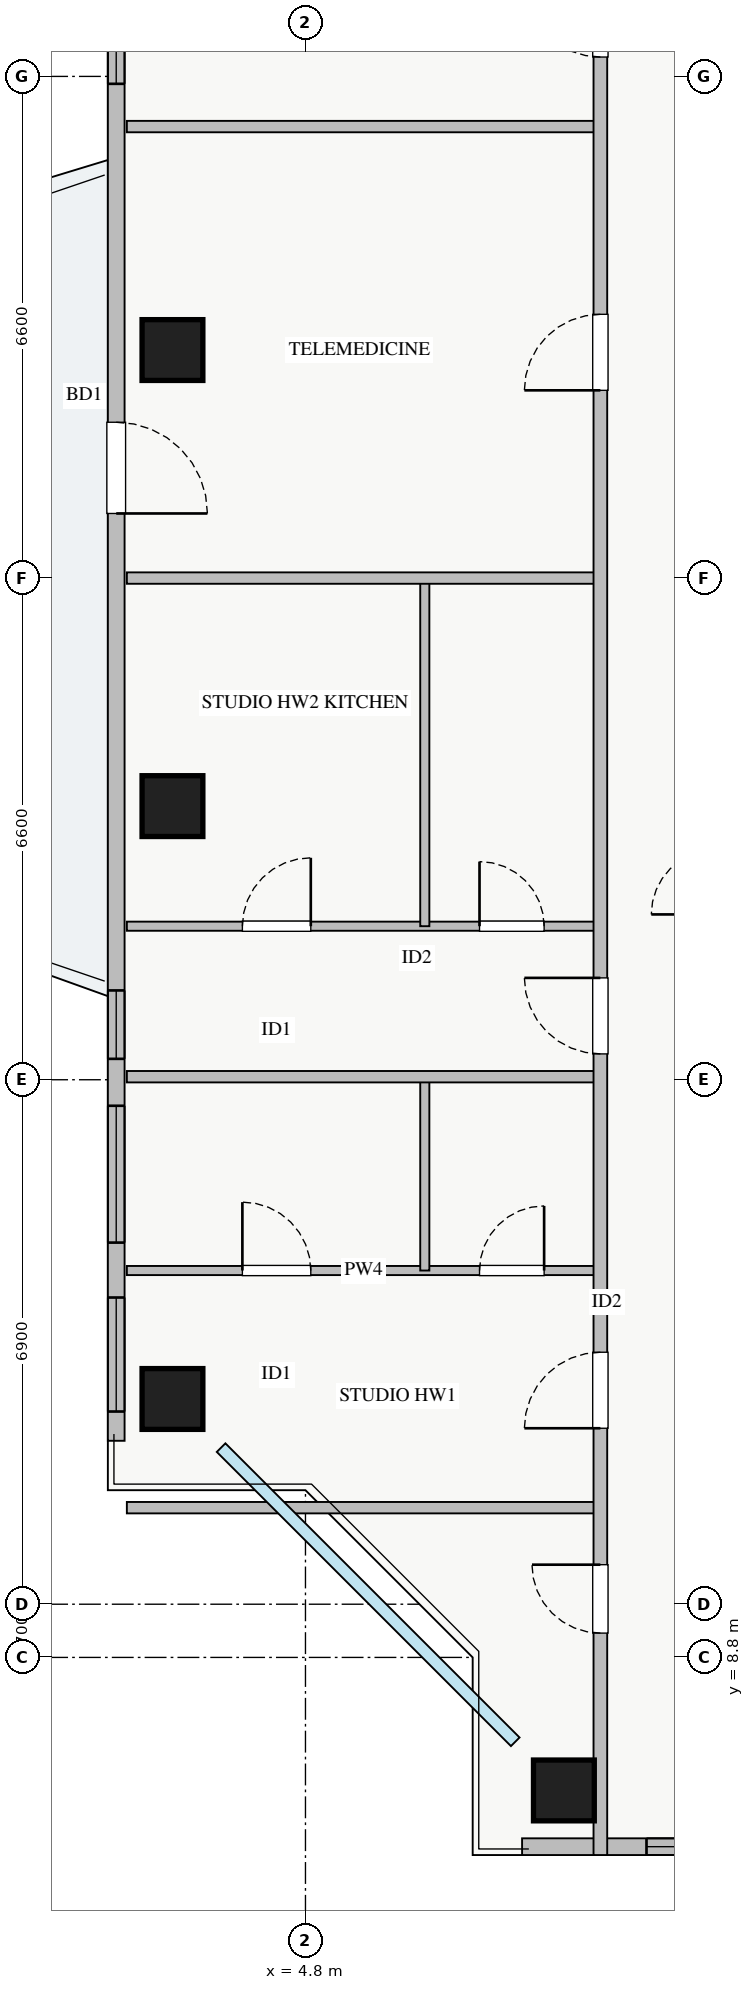
"""IFC4 building model, lengths in metres.
Left out: names, types, materials, properties, quantities, classifications, styles, units other than length and angle.
Written with IfcOpenShell. Run it as: python <this file> out.ifc"""

import sys

from ifc_helpers import new_model, si_unit, direction, frame, frame_2d, origin, origin_2d, place, context, subcontext, project, spatial, rectangle, extrude, source, transform, mapped, element, fill, save


model = new_model("IFC4")
c1 = context("Model", 3, precision=1e-05, world=origin(), true_north=direction((0.0, 1.0)))
c2 = subcontext(c1, "Body", "Model", "MODEL_VIEW")
j1 = project(units=[si_unit("LENGTHUNIT", "METRE"), si_unit("PLANEANGLEUNIT", "RADIAN")], contexts=[c1])
p1 = place(None, origin())
s1 = spatial("IfcSite", under=j1, at=p1, CompositionType="ELEMENT")
p2 = place(p1, origin())
s2 = spatial("IfcBuilding", under=s1, at=p2, CompositionType="ELEMENT")
p3 = place(p2, frame((0.0, 0.0, 213.25)))
s3 = spatial("IfcBuildingStorey", under=s2, at=p3, CompositionType="ELEMENT", Elevation=213.25)
m1 = source(origin(), c2, "Body", "SweptSolid", [
    extrude(rectangle(XDim=0.8, YDim=0.8, at=origin_2d()), origin(), (0.0, 0.0, 1.0), 3.25),
])
for number, where, z_axis, x_axis in (
    (1, (8.2, 7.05, 0.0), (0.0, 0.0, 1.0), (1.0, 0.0, 0.0)),
    (2, (3.05, 26.0, 0.0), (0.0, 0.0, 1.0), (1.0, 0.0, 0.0)),
    (3, (3.05, 20.0, 0.0), (0.0, 0.0, 1.0), (1.0, 0.0, 0.0)),
    (4, (3.05, 12.2, 0.0), (0.0, 0.0, 1.0), (1.0, 0.0, 0.0)),
):
    element("IfcColumn", number, at=place(p3, frame(where, z_axis=z_axis, x_axis=x_axis)), inside=s3, PredefinedType="COLUMN", context=c2, shape_type="MappedRepresentation", body=[
        mapped(m1, transform((0.0, 0.0, 0.0), x_axis=(1.0, 0.0, 0.0), y_axis=(0.0, 1.0, 0.0), z_axis=(0.0, 0.0, 1.0), scale=1.0)),
    ])
p4 = place(p3, frame((7.65, 6.31, 0.0), z_axis=(0.0, 0.0, 1.0), x_axis=(1.0, 0.0, 0.0)))
e5 = element("IfcWall", 5, at=p4, inside=s3, PredefinedType="STANDARD", context=c2, shape_type="SweptSolid", body=[
    extrude(rectangle(XDim=22.7, YDim=0.22, at=frame_2d((11.35, 0.0))), origin(), (0.0, 0.0, 1.0), 2.61),
])
p5 = place(p4, frame((12.2, 0.0, 0.0)))
e6 = element("IfcOpeningElement", 6, at=p5, cuts=e5, PredefinedType="OPENING", context=c2, shape_type="SweptSolid", body=[
    extrude(rectangle(XDim=1.2, YDim=2.1, at=frame_2d((0.6, 1.05))), frame((0.0, 0.12, 0.0), z_axis=(0.0, -1.0, 0.0), x_axis=(1.0, 0.0, 0.0)), (0.0, 0.0, 1.0), 0.24),
])
p6 = place(p4, frame((1.637, 0.0, 0.9)))
e7 = element("IfcOpeningElement", 7, at=p6, cuts=e5, PredefinedType="OPENING", context=c2, shape_type="SweptSolid", body=[
    extrude(rectangle(XDim=2.4, YDim=1.48, at=frame_2d((1.2, 0.74))), frame((0.0, 0.12, 0.0), z_axis=(0.0, -1.0, 0.0), x_axis=(1.0, 0.0, 0.0)), (0.0, 0.0, 1.0), 0.24),
])
p7 = place(p4, frame((7.612, 0.0, 0.9)))
e8 = element("IfcOpeningElement", 8, at=p7, cuts=e5, PredefinedType="OPENING", context=c2, shape_type="SweptSolid", body=[
    extrude(rectangle(XDim=1.8, YDim=1.45, at=frame_2d((0.9, 0.725))), frame((0.0, 0.12, 0.0), z_axis=(0.0, -1.0, 0.0), x_axis=(1.0, 0.0, 0.0)), (0.0, 0.0, 1.0), 0.24),
])
p8 = place(p4, frame((20.238, 0.0, 0.9)))
e9 = element("IfcOpeningElement", 9, at=p8, cuts=e5, PredefinedType="OPENING", context=c2, shape_type="SweptSolid", body=[
    extrude(rectangle(XDim=2.1, YDim=1.5, at=frame_2d((1.05, 0.75))), frame((0.0, 0.12, 0.0), z_axis=(0.0, -1.0, 0.0), x_axis=(1.0, 0.0, 0.0)), (0.0, 0.0, 1.0), 0.24),
])
p9 = place(p4, frame((17.02, 0.0, 0.9)))
e10 = element("IfcOpeningElement", 10, at=p9, cuts=e5, PredefinedType="OPENING", context=c2, shape_type="SweptSolid", body=[
    extrude(rectangle(XDim=2.4, YDim=1.5, at=frame_2d((1.2, 0.75))), frame((0.0, 0.12, 0.0), z_axis=(0.0, -1.0, 0.0), x_axis=(1.0, 0.0, 0.0)), (0.0, 0.0, 1.0), 0.24),
])
p10 = place(p3, frame((2.31, 11.65, 0.0), z_axis=(0.0, 0.0, 1.0), x_axis=(0.0, 1.0, 0.0)))
e11 = element("IfcWall", 11, at=p10, inside=s3, PredefinedType="STANDARD", context=c2, shape_type="SweptSolid", body=[
    extrude(rectangle(XDim=22.7, YDim=0.22, at=frame_2d((11.35, 0.0))), origin(), (0.0, 0.0, 1.0), 2.61),
])
p11 = place(p10, frame((12.2, 0.0, 0.0)))
e12 = element("IfcOpeningElement", 12, at=p11, cuts=e11, PredefinedType="OPENING", context=c2, shape_type="SweptSolid", body=[
    extrude(rectangle(XDim=1.2, YDim=2.1, at=frame_2d((0.6, 1.05))), frame((0.0, 0.12, 0.0), z_axis=(0.0, -1.0, 0.0), x_axis=(1.0, 0.0, 0.0)), (0.0, 0.0, 1.0), 0.24),
])
p12 = place(p10, frame((2.607, 0.0, 0.9)))
e13 = element("IfcOpeningElement", 13, at=p12, cuts=e11, PredefinedType="OPENING", context=c2, shape_type="SweptSolid", body=[
    extrude(rectangle(XDim=1.8, YDim=1.5, at=frame_2d((0.9, 0.75))), frame((0.0, 0.12, 0.0), z_axis=(0.0, -1.0, 0.0), x_axis=(1.0, 0.0, 0.0)), (0.0, 0.0, 1.0), 0.24),
])
p13 = place(p10, frame((17.853, 0.0, 0.9)))
e14 = element("IfcOpeningElement", 14, at=p13, cuts=e11, PredefinedType="OPENING", context=c2, shape_type="SweptSolid", body=[
    extrude(rectangle(XDim=2.1, YDim=1.5, at=frame_2d((1.05, 0.75))), frame((0.0, 0.12, 0.0), z_axis=(0.0, -1.0, 0.0), x_axis=(1.0, 0.0, 0.0)), (0.0, 0.0, 1.0), 0.24),
])
p14 = place(p10, frame((0.385, 0.0, 0.9)))
e15 = element("IfcOpeningElement", 15, at=p14, cuts=e11, PredefinedType="OPENING", context=c2, shape_type="SweptSolid", body=[
    extrude(rectangle(XDim=1.5, YDim=1.5, at=frame_2d((0.75, 0.75))), frame((0.0, 0.12, 0.0), z_axis=(0.0, -1.0, 0.0), x_axis=(1.0, 0.0, 0.0)), (0.0, 0.0, 1.0), 0.24),
])
p15 = place(p10, frame((20.835, 0.0, 0.9)))
e16 = element("IfcOpeningElement", 16, at=p15, cuts=e11, PredefinedType="OPENING", context=c2, shape_type="SweptSolid", body=[
    extrude(rectangle(XDim=1.5, YDim=1.5, at=frame_2d((0.75, 0.75))), frame((0.0, 0.12, 0.0), z_axis=(0.0, -1.0, 0.0), x_axis=(1.0, 0.0, 0.0)), (0.0, 0.0, 1.0), 0.24),
])
p16 = place(p10, frame((5.025, 0.0, 0.9)))
e17 = element("IfcOpeningElement", 17, at=p16, cuts=e11, PredefinedType="OPENING", context=c2, shape_type="SweptSolid", body=[
    extrude(rectangle(XDim=0.9, YDim=1.2, at=frame_2d((0.45, 0.6))), frame((0.0, 0.12, 0.0), z_axis=(0.0, -1.0, 0.0), x_axis=(1.0, 0.0, 0.0)), (0.0, 0.0, 1.0), 0.24),
])
p17 = place(p3, frame((2.45, 10.77, 0.0), z_axis=(0.0, 0.0, 1.0), x_axis=(1.0, 0.0, 0.0)))
e18 = element("IfcWall", 18, at=p17, inside=s3, PredefinedType="PARTITIONING", context=c2, shape_type="SweptSolid", body=[
    extrude(rectangle(XDim=6.23, YDim=0.15, at=frame_2d((3.115, 0.0))), origin(), (0.0, 0.0, 1.0), 3.07),
])
p18 = place(p3, frame((2.45, 13.89, 0.0), z_axis=(0.0, 0.0, 1.0), x_axis=(1.0, 0.0, 0.0)))
e19 = element("IfcWall", 19, at=p18, inside=s3, PredefinedType="PLUMBINGWALL", context=c2, shape_type="SweptSolid", body=[
    extrude(rectangle(XDim=6.23, YDim=0.12, at=frame_2d((3.115, 0.0))), origin(), (0.0, 0.0, 1.0), 3.07),
])
p19 = place(p18, frame((1.52, 0.0, 0.0)))
e20 = element("IfcOpeningElement", 20, at=p19, cuts=e19, PredefinedType="OPENING", context=c2, shape_type="SweptSolid", body=[
    extrude(rectangle(XDim=0.9, YDim=2.05, at=frame_2d((0.45, 1.025))), frame((0.0, 0.07, 0.0), z_axis=(0.0, -1.0, 0.0), x_axis=(1.0, 0.0, 0.0)), (0.0, 0.0, 1.0), 0.14),
])
p20 = place(p18, frame((4.64, 0.0, 0.0)))
e21 = element("IfcOpeningElement", 21, at=p20, cuts=e19, PredefinedType="OPENING", context=c2, shape_type="SweptSolid", body=[
    extrude(rectangle(XDim=0.85, YDim=2.05, at=frame_2d((0.425, 1.025))), frame((0.0, 0.07, 0.0), z_axis=(0.0, -1.0, 0.0), x_axis=(1.0, 0.0, 0.0)), (0.0, 0.0, 1.0), 0.14),
])
p21 = place(p3, frame((6.37, 13.89, 0.0), z_axis=(0.0, 0.0, 1.0), x_axis=(0.0, 1.0, 0.0)))
e22 = element("IfcWall", 22, at=p21, inside=s3, PredefinedType="PLUMBINGWALL", context=c2, shape_type="SweptSolid", body=[
    extrude(rectangle(XDim=2.55, YDim=0.12, at=frame_2d((1.275, 0.0))), origin(), (0.0, 0.0, 1.0), 3.07),
])
p22 = place(p3, frame((2.45, 18.42, 0.0), z_axis=(0.0, 0.0, 1.0), x_axis=(1.0, 0.0, 0.0)))
e23 = element("IfcWall", 23, at=p22, inside=s3, PredefinedType="PLUMBINGWALL", context=c2, shape_type="SweptSolid", body=[
    extrude(rectangle(XDim=6.23, YDim=0.12, at=frame_2d((3.115, 0.0))), origin(), (0.0, 0.0, 1.0), 3.07),
])
p23 = place(p22, frame((1.52, 0.0, 0.0)))
e24 = element("IfcOpeningElement", 24, at=p23, cuts=e23, PredefinedType="OPENING", context=c2, shape_type="SweptSolid", body=[
    extrude(rectangle(XDim=0.9, YDim=2.05, at=frame_2d((0.45, 1.025))), frame((0.0, 0.07, 0.0), z_axis=(0.0, -1.0, 0.0), x_axis=(1.0, 0.0, 0.0)), (0.0, 0.0, 1.0), 0.14),
])
p24 = place(p22, frame((4.64, 0.0, 0.0)))
e25 = element("IfcOpeningElement", 25, at=p24, cuts=e23, PredefinedType="OPENING", context=c2, shape_type="SweptSolid", body=[
    extrude(rectangle(XDim=0.85, YDim=2.05, at=frame_2d((0.425, 1.025))), frame((0.0, 0.07, 0.0), z_axis=(0.0, -1.0, 0.0), x_axis=(1.0, 0.0, 0.0)), (0.0, 0.0, 1.0), 0.14),
])
p25 = place(p3, frame((6.37, 18.42, 0.0), z_axis=(0.0, 0.0, 1.0), x_axis=(0.0, 1.0, 0.0)))
e26 = element("IfcWall", 26, at=p25, inside=s3, PredefinedType="PLUMBINGWALL", context=c2, shape_type="SweptSolid", body=[
    extrude(rectangle(XDim=4.58, YDim=0.12, at=frame_2d((2.29, 0.0))), origin(), (0.0, 0.0, 1.0), 3.07),
])
for number, where, z_axis, x_axis in (
    (27, (2.45, 16.44, 0.0), (0.0, 0.0, 1.0), (1.0, 0.0, 0.0)),
    (28, (2.45, 23.0, 0.0), (0.0, 0.0, 1.0), (1.0, 0.0, 0.0)),
    (29, (2.45, 28.94, 0.0), (0.0, 0.0, 1.0), (1.0, 0.0, 0.0)),
):
    element("IfcWall", number, at=place(p3, frame(where, z_axis=z_axis, x_axis=x_axis)), inside=s3, PredefinedType="PARTITIONING", context=c2, shape_type="SweptSolid", body=[
        extrude(rectangle(XDim=6.23, YDim=0.15, at=frame_2d((3.115, 0.0))), origin(), (0.0, 0.0, 1.0), 3.07),
    ])
p26 = place(p3, frame((8.68, 6.2, 0.0), z_axis=(0.0, 0.0, 1.0), x_axis=(0.0, 1.0, 0.0)))
e30 = element("IfcWall", 30, at=p26, inside=s3, PredefinedType="PARTITIONING", context=c2, shape_type="SweptSolid", body=[
    extrude(rectangle(XDim=33.6, YDim=0.18, at=frame_2d((16.8, 0.0))), origin(), (0.0, 0.0, 1.0), 3.07),
])
p27 = place(p26, frame((29.605, 0.0, 0.0)))
e31 = element("IfcOpeningElement", 31, at=p27, cuts=e30, PredefinedType="OPENING", context=c2, shape_type="SweptSolid", body=[
    extrude(rectangle(XDim=0.9, YDim=2.05, at=frame_2d((0.45, 1.025))), frame((0.0, 0.1, 0.0), z_axis=(0.0, -1.0, 0.0), x_axis=(1.0, 0.0, 0.0)), (0.0, 0.0, 1.0), 0.2),
])
p28 = place(p26, frame((2.92, 0.0, 0.0)))
e32 = element("IfcOpeningElement", 32, at=p28, cuts=e30, PredefinedType="OPENING", context=c2, shape_type="SweptSolid", body=[
    extrude(rectangle(XDim=0.9, YDim=2.05, at=frame_2d((0.45, 1.025))), frame((0.0, 0.1, 0.0), z_axis=(0.0, -1.0, 0.0), x_axis=(1.0, 0.0, 0.0)), (0.0, 0.0, 1.0), 0.2),
])
p29 = place(p26, frame((5.615, 0.0, 0.0)))
e33 = element("IfcOpeningElement", 33, at=p29, cuts=e30, PredefinedType="OPENING", context=c2, shape_type="SweptSolid", body=[
    extrude(rectangle(XDim=1.0, YDim=2.05, at=frame_2d((0.5, 1.025))), frame((0.0, 0.1, 0.0), z_axis=(0.0, -1.0, 0.0), x_axis=(1.0, 0.0, 0.0)), (0.0, 0.0, 1.0), 0.2),
])
p30 = place(p26, frame((10.54, 0.0, 0.0)))
e34 = element("IfcOpeningElement", 34, at=p30, cuts=e30, PredefinedType="OPENING", context=c2, shape_type="SweptSolid", body=[
    extrude(rectangle(XDim=1.0, YDim=2.05, at=frame_2d((0.5, 1.025))), frame((0.0, 0.1, 0.0), z_axis=(0.0, -1.0, 0.0), x_axis=(1.0, 0.0, 0.0)), (0.0, 0.0, 1.0), 0.2),
])
p31 = place(p26, frame((19.27, 0.0, 0.0)))
e35 = element("IfcOpeningElement", 35, at=p31, cuts=e30, PredefinedType="OPENING", context=c2, shape_type="SweptSolid", body=[
    extrude(rectangle(XDim=1.0, YDim=2.05, at=frame_2d((0.5, 1.025))), frame((0.0, 0.1, 0.0), z_axis=(0.0, -1.0, 0.0), x_axis=(1.0, 0.0, 0.0)), (0.0, 0.0, 1.0), 0.2),
])
p32 = place(p26, frame((23.655, 0.0, 0.0)))
e36 = element("IfcOpeningElement", 36, at=p32, cuts=e30, PredefinedType="OPENING", context=c2, shape_type="SweptSolid", body=[
    extrude(rectangle(XDim=1.0, YDim=2.05, at=frame_2d((0.5, 1.025))), frame((0.0, 0.1, 0.0), z_axis=(0.0, -1.0, 0.0), x_axis=(1.0, 0.0, 0.0)), (0.0, 0.0, 1.0), 0.2),
])
m2 = source(origin(), c2, "Body", "SweptSolid", [
    extrude(rectangle(XDim=2.4, YDim=1.48, at=frame_2d((1.2, 0.74))), frame((0.0, 0.03, 0.0), z_axis=(0.0, -1.0, 0.0), x_axis=(1.0, 0.0, 0.0)), (0.0, 0.0, 1.0), 0.06),
])
p33 = place(p6, origin())
e37 = element("IfcWindow", 37, at=p33, inside=s3, PartitioningType="TRIPLE_PANEL_VERTICAL", PredefinedType="WINDOW", context=c2, shape_type="MappedRepresentation", body=[
    mapped(m2, transform((0.0, 0.0, 0.0), x_axis=(1.0, 0.0, 0.0), y_axis=(0.0, 1.0, 0.0), z_axis=(0.0, 0.0, 1.0), scale=1.0)),
])
fill(e7, e37)
m3 = source(origin(), c2, "Body", "SweptSolid", [
    extrude(rectangle(XDim=1.2, YDim=2.1, at=frame_2d((0.6, 1.05))), frame((0.0, 0.025, 0.0), z_axis=(0.0, -1.0, 0.0), x_axis=(1.0, 0.0, 0.0)), (0.0, 0.0, 1.0), 0.05),
])
p34 = place(p11, frame((1.2, 0.0, 0.0), z_axis=(0.0, 0.0, 1.0), x_axis=(-1.0, 0.0, 0.0)))
e38 = element("IfcDoor", 38, at=p34, inside=s3, OperationType="SINGLE_SWING_LEFT", PredefinedType="DOOR", context=c2, shape_type="MappedRepresentation", body=[
    mapped(m3, transform((0.0, 0.0, 0.0), x_axis=(1.0, 0.0, 0.0), y_axis=(0.0, 1.0, 0.0), z_axis=(0.0, 0.0, 1.0), scale=1.0)),
])
fill(e12, e38)
m4 = source(origin(), c2, "Body", "SweptSolid", [
    extrude(rectangle(XDim=1.8, YDim=1.5, at=frame_2d((0.9, 0.75))), frame((0.0, 0.03, 0.0), z_axis=(0.0, -1.0, 0.0), x_axis=(1.0, 0.0, 0.0)), (0.0, 0.0, 1.0), 0.06),
])
p35 = place(p12, origin())
e39 = element("IfcWindow", 39, at=p35, inside=s3, PartitioningType="TRIPLE_PANEL_VERTICAL", PredefinedType="WINDOW", context=c2, shape_type="MappedRepresentation", body=[
    mapped(m4, transform((0.0, 0.0, 0.0), x_axis=(1.0, 0.0, 0.0), y_axis=(0.0, 1.0, 0.0), z_axis=(0.0, 0.0, 1.0), scale=1.0)),
])
fill(e13, e39)
m5 = source(origin(), c2, "Body", "SweptSolid", [
    extrude(rectangle(XDim=2.1, YDim=1.5, at=frame_2d((1.05, 0.75))), frame((0.0, 0.03, 0.0), z_axis=(0.0, -1.0, 0.0), x_axis=(1.0, 0.0, 0.0)), (0.0, 0.0, 1.0), 0.06),
])
p36 = place(p13, origin())
e40 = element("IfcWindow", 40, at=p36, inside=s3, PartitioningType="TRIPLE_PANEL_VERTICAL", PredefinedType="WINDOW", context=c2, shape_type="MappedRepresentation", body=[
    mapped(m5, transform((0.0, 0.0, 0.0), x_axis=(1.0, 0.0, 0.0), y_axis=(0.0, 1.0, 0.0), z_axis=(0.0, 0.0, 1.0), scale=1.0)),
])
fill(e14, e40)
m6 = source(origin(), c2, "Body", "SweptSolid", [
    extrude(rectangle(XDim=0.9, YDim=2.05, at=frame_2d((0.45, 1.025))), frame((0.0, 0.025, 0.0), z_axis=(0.0, -1.0, 0.0), x_axis=(1.0, 0.0, 0.0)), (0.0, 0.0, 1.0), 0.05),
])
p37 = place(p19, origin())
e41 = element("IfcDoor", 41, at=p37, inside=s3, OperationType="SINGLE_SWING_LEFT", PredefinedType="DOOR", context=c2, shape_type="MappedRepresentation", body=[
    mapped(m6, transform((0.0, 0.0, 0.0), x_axis=(1.0, 0.0, 0.0), y_axis=(0.0, 1.0, 0.0), z_axis=(0.0, 0.0, 1.0), scale=1.0)),
])
fill(e20, e41)
m7 = source(origin(), c2, "Body", "SweptSolid", [
    extrude(rectangle(XDim=0.85, YDim=2.05, at=frame_2d((0.425, 1.025))), frame((0.0, 0.025, 0.0), z_axis=(0.0, -1.0, 0.0), x_axis=(1.0, 0.0, 0.0)), (0.0, 0.0, 1.0), 0.05),
])
p38 = place(p20, origin())
e42 = element("IfcDoor", 42, at=p38, inside=s3, OperationType="SINGLE_SWING_RIGHT", PredefinedType="DOOR", context=c2, shape_type="MappedRepresentation", body=[
    mapped(m7, transform((0.0, 0.0, 0.0), x_axis=(1.0, 0.0, 0.0), y_axis=(0.0, 1.0, 0.0), z_axis=(0.0, 0.0, 1.0), scale=1.0)),
])
fill(e21, e42)
p39 = place(p23, origin())
e43 = element("IfcDoor", 43, at=p39, inside=s3, OperationType="SINGLE_SWING_RIGHT", PredefinedType="DOOR", context=c2, shape_type="MappedRepresentation", body=[
    mapped(m6, transform((0.0, 0.0, 0.0), x_axis=(1.0, 0.0, 0.0), y_axis=(0.0, 1.0, 0.0), z_axis=(0.0, 0.0, 1.0), scale=1.0)),
])
fill(e24, e43)
p40 = place(p24, origin())
e44 = element("IfcDoor", 44, at=p40, inside=s3, OperationType="SINGLE_SWING_LEFT", PredefinedType="DOOR", context=c2, shape_type="MappedRepresentation", body=[
    mapped(m7, transform((0.0, 0.0, 0.0), x_axis=(1.0, 0.0, 0.0), y_axis=(0.0, 1.0, 0.0), z_axis=(0.0, 0.0, 1.0), scale=1.0)),
])
fill(e25, e44)
p41 = place(p28, origin())
e45 = element("IfcDoor", 45, at=p41, inside=s3, OperationType="SINGLE_SWING_RIGHT", PredefinedType="DOOR", context=c2, shape_type="MappedRepresentation", body=[
    mapped(m6, transform((0.0, 0.0, 0.0), x_axis=(1.0, 0.0, 0.0), y_axis=(0.0, 1.0, 0.0), z_axis=(0.0, 0.0, 1.0), scale=1.0)),
])
fill(e32, e45)
m8 = source(origin(), c2, "Body", "SweptSolid", [
    extrude(rectangle(XDim=1.0, YDim=2.05, at=frame_2d((0.5, 1.025))), frame((0.0, 0.025, 0.0), z_axis=(0.0, -1.0, 0.0), x_axis=(1.0, 0.0, 0.0)), (0.0, 0.0, 1.0), 0.05),
])
p42 = place(p29, origin())
e46 = element("IfcDoor", 46, at=p42, inside=s3, OperationType="SINGLE_SWING_LEFT", PredefinedType="DOOR", context=c2, shape_type="MappedRepresentation", body=[
    mapped(m8, transform((0.0, 0.0, 0.0), x_axis=(1.0, 0.0, 0.0), y_axis=(0.0, 1.0, 0.0), z_axis=(0.0, 0.0, 1.0), scale=1.0)),
])
fill(e33, e46)
p43 = place(p30, origin())
e47 = element("IfcDoor", 47, at=p43, inside=s3, OperationType="SINGLE_SWING_RIGHT", PredefinedType="DOOR", context=c2, shape_type="MappedRepresentation", body=[
    mapped(m8, transform((0.0, 0.0, 0.0), x_axis=(1.0, 0.0, 0.0), y_axis=(0.0, 1.0, 0.0), z_axis=(0.0, 0.0, 1.0), scale=1.0)),
])
fill(e34, e47)
p44 = place(p31, origin())
e48 = element("IfcDoor", 48, at=p44, inside=s3, OperationType="SINGLE_SWING_LEFT", PredefinedType="DOOR", context=c2, shape_type="MappedRepresentation", body=[
    mapped(m8, transform((0.0, 0.0, 0.0), x_axis=(1.0, 0.0, 0.0), y_axis=(0.0, 1.0, 0.0), z_axis=(0.0, 0.0, 1.0), scale=1.0)),
])
fill(e35, e48)
p45 = place(p32, origin())
e49 = element("IfcDoor", 49, at=p45, inside=s3, OperationType="SINGLE_SWING_RIGHT", PredefinedType="DOOR", context=c2, shape_type="MappedRepresentation", body=[
    mapped(m8, transform((0.0, 0.0, 0.0), x_axis=(1.0, 0.0, 0.0), y_axis=(0.0, 1.0, 0.0), z_axis=(0.0, 0.0, 1.0), scale=1.0)),
])
fill(e36, e49)
m9 = source(origin(), c2, "Body", "SweptSolid", [
    extrude(rectangle(XDim=1.5, YDim=1.5, at=frame_2d((0.75, 0.75))), frame((0.0, 0.03, 0.0), z_axis=(0.0, -1.0, 0.0), x_axis=(1.0, 0.0, 0.0)), (0.0, 0.0, 1.0), 0.06),
])
p46 = place(p14, origin())
e50 = element("IfcWindow", 50, at=p46, inside=s3, PartitioningType="DOUBLE_PANEL_VERTICAL", PredefinedType="WINDOW", context=c2, shape_type="MappedRepresentation", body=[
    mapped(m9, transform((0.0, 0.0, 0.0), x_axis=(1.0, 0.0, 0.0), y_axis=(0.0, 1.0, 0.0), z_axis=(0.0, 0.0, 1.0), scale=1.0)),
])
fill(e15, e50)
m10 = source(origin(), c2, "Body", "SweptSolid", [
    extrude(rectangle(XDim=0.9, YDim=1.2, at=frame_2d((0.45, 0.6))), frame((0.0, 0.03, 0.0), z_axis=(0.0, -1.0, 0.0), x_axis=(1.0, 0.0, 0.0)), (0.0, 0.0, 1.0), 0.06),
])
p47 = place(p16, origin())
e51 = element("IfcWindow", 51, at=p47, inside=s3, PartitioningType="SINGLE_PANEL", PredefinedType="WINDOW", context=c2, shape_type="MappedRepresentation", body=[
    mapped(m10, transform((0.0, 0.0, 0.0), x_axis=(1.0, 0.0, 0.0), y_axis=(0.0, 1.0, 0.0), z_axis=(0.0, 0.0, 1.0), scale=1.0)),
])
fill(e17, e51)
save(model, sys.argv[1])
